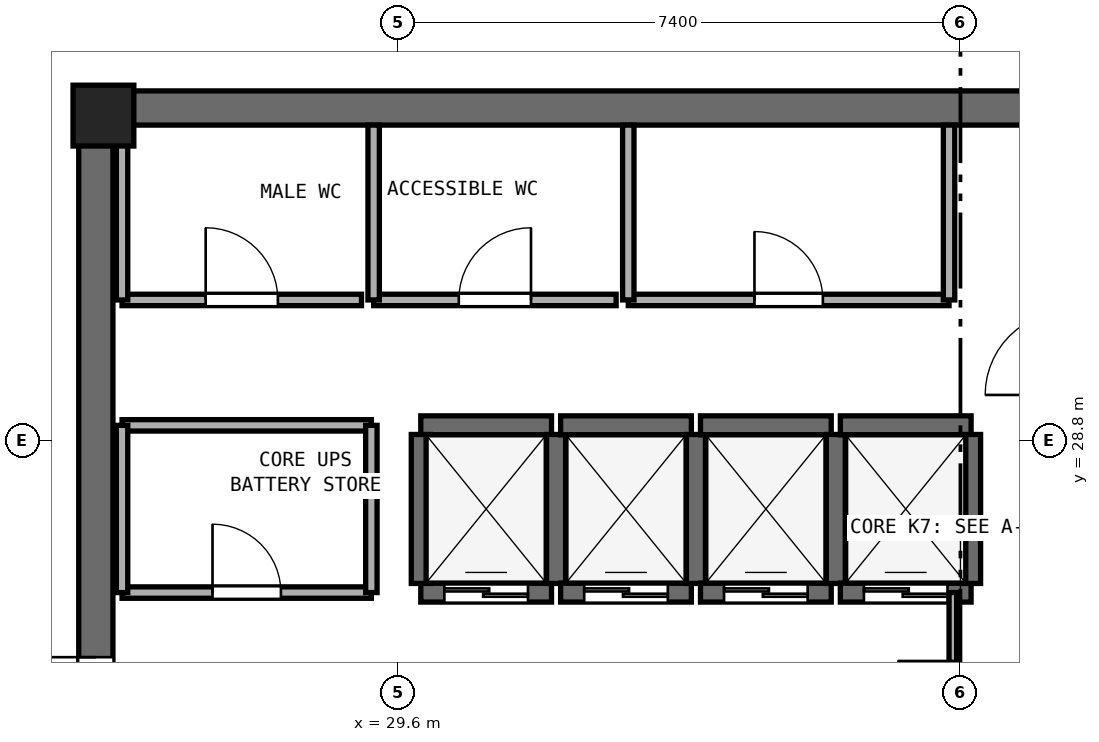
"""IFC4 building model, lengths in metres.
Left out: names, types, materials, properties, quantities, classifications, styles, units other than length and angle.
Written with IfcOpenShell. Run it as: python <this file> out.ifc"""

import sys

from ifc_helpers import new_model, si_unit, direction, frame, frame_2d, origin, origin_2d, place, context, subcontext, project, spatial, rectangle, extrude, element, fill, save


model = new_model("IFC4")
c1 = context("Model", 3, precision=1e-05, world=origin(), true_north=direction((0.0, 1.0)))
c2 = subcontext(c1, "Body", "Model", "MODEL_VIEW")
j1 = project(units=[si_unit("LENGTHUNIT", "METRE"), si_unit("PLANEANGLEUNIT", "RADIAN")], contexts=[c1])
p1 = place(None, origin())
s1 = spatial("IfcSite", under=j1, at=p1, CompositionType="ELEMENT")
p2 = place(p1, origin())
s2 = spatial("IfcBuilding", under=s1, at=p2, CompositionType="ELEMENT")
p3 = place(p2, frame((0.0, 0.0, 240.2)))
s3 = spatial("IfcBuildingStorey", under=s2, at=p3, CompositionType="ELEMENT", Elevation=240.2)
p4 = place(p3, frame((25.4, 33.175, 0.0), z_axis=(0.0, 0.0, 1.0), x_axis=(1.0, 0.0, 0.0)))
e1 = element("IfcWall", 1, at=p4, inside=s3, PredefinedType="SHEAR", context=c2, shape_type="SweptSolid", body=[
    extrude(rectangle(XDim=23.2, YDim=0.45, at=frame_2d((11.6, 0.0))), origin(), (0.0, 0.0, 1.0), 3.51),
])
p5 = place(p3, frame((25.625, 17.45, 0.0), z_axis=(0.0, 0.0, 1.0), x_axis=(0.0, 1.0, 0.0)))
e2 = element("IfcWall", 2, at=p5, inside=s3, PredefinedType="SHEAR", context=c2, shape_type="SweptSolid", body=[
    extrude(rectangle(XDim=15.5, YDim=0.45, at=frame_2d((7.75, 0.0))), origin(), (0.0, 0.0, 1.0), 3.51),
])
p6 = place(p5, frame((7.0, 0.0, 0.0)))
e3 = element("IfcOpeningElement", 3, at=p6, cuts=e2, PredefinedType="OPENING", context=c2, shape_type="SweptSolid", body=[
    extrude(rectangle(XDim=1.5, YDim=2.15, at=frame_2d((0.75, 1.075))), frame((0.0, 0.235, 0.0), z_axis=(0.0, -1.0, 0.0), x_axis=(1.0, 0.0, 0.0)), (0.0, 0.0, 1.0), 0.47),
])
p7 = place(p3, frame((25.725, 33.075, 0.0), z_axis=(0.0, 0.0, 1.0), x_axis=(1.0, 0.0, 0.0)))
e4 = element("IfcColumn", 4, at=p7, inside=s3, PredefinedType="PILASTER", context=c2, shape_type="SweptSolid", body=[
    extrude(rectangle(XDim=0.8, YDim=0.8, at=origin_2d()), origin(), (0.0, 0.0, 1.0), 3.8),
])
p8 = place(p3, frame((29.9, 26.8, 0.0), z_axis=(0.0, 0.0, 1.0), x_axis=(1.0, 0.0, 0.0)))
e5 = element("IfcWall", 5, at=p8, inside=s3, PredefinedType="SHEAR", context=c2, shape_type="SweptSolid", body=[
    extrude(rectangle(XDim=1.72, YDim=0.25, at=frame_2d((0.86, 0.0))), origin(), (0.0, 0.0, 1.0), 3.51),
])
p9 = place(p8, frame((0.31, 0.0, 0.0)))
e6 = element("IfcOpeningElement", 6, at=p9, cuts=e5, PredefinedType="OPENING", context=c2, shape_type="SweptSolid", body=[
    extrude(rectangle(XDim=1.1, YDim=2.15, at=frame_2d((0.55, 1.075))), frame((0.0, 0.135, 0.0), z_axis=(0.0, -1.0, 0.0), x_axis=(1.0, 0.0, 0.0)), (0.0, 0.0, 1.0), 0.27),
])
p10 = place(p3, frame((29.9, 29.0, 0.0), z_axis=(0.0, 0.0, 1.0), x_axis=(1.0, 0.0, 0.0)))
e7 = element("IfcWall", 7, at=p10, inside=s3, PredefinedType="SHEAR", context=c2, shape_type="SweptSolid", body=[
    extrude(rectangle(XDim=1.72, YDim=0.25, at=frame_2d((0.86, 0.0))), origin(), (0.0, 0.0, 1.0), 3.51),
])
for number, where, z_axis, x_axis in (
    (8, (29.9, 26.92, 0.0), (0.0, 0.0, 1.0), (0.0, 1.0, 0.0)),
    (9, (31.68, 26.92, 0.0), (0.0, 0.0, 1.0), (0.0, 1.0, 0.0)),
):
    element("IfcWall", number, at=place(p3, frame(where, z_axis=z_axis, x_axis=x_axis)), inside=s3, PredefinedType="SHEAR", context=c2, shape_type="SweptSolid", body=[
        extrude(rectangle(XDim=1.96, YDim=0.25, at=frame_2d((0.98, 0.0))), origin(), (0.0, 0.0, 1.0), 3.51),
    ])
p11 = place(p3, frame((31.74, 26.8, 0.0), z_axis=(0.0, 0.0, 1.0), x_axis=(1.0, 0.0, 0.0)))
e10 = element("IfcWall", 10, at=p11, inside=s3, PredefinedType="SHEAR", context=c2, shape_type="SweptSolid", body=[
    extrude(rectangle(XDim=1.72, YDim=0.25, at=frame_2d((0.86, 0.0))), origin(), (0.0, 0.0, 1.0), 3.51),
])
p12 = place(p11, frame((0.31, 0.0, 0.0)))
e11 = element("IfcOpeningElement", 11, at=p12, cuts=e10, PredefinedType="OPENING", context=c2, shape_type="SweptSolid", body=[
    extrude(rectangle(XDim=1.1, YDim=2.15, at=frame_2d((0.55, 1.075))), frame((0.0, 0.135, 0.0), z_axis=(0.0, -1.0, 0.0), x_axis=(1.0, 0.0, 0.0)), (0.0, 0.0, 1.0), 0.27),
])
p13 = place(p3, frame((31.74, 29.0, 0.0), z_axis=(0.0, 0.0, 1.0), x_axis=(1.0, 0.0, 0.0)))
e12 = element("IfcWall", 12, at=p13, inside=s3, PredefinedType="SHEAR", context=c2, shape_type="SweptSolid", body=[
    extrude(rectangle(XDim=1.72, YDim=0.25, at=frame_2d((0.86, 0.0))), origin(), (0.0, 0.0, 1.0), 3.51),
])
p14 = place(p3, frame((33.52, 26.92, 0.0), z_axis=(0.0, 0.0, 1.0), x_axis=(0.0, 1.0, 0.0)))
e13 = element("IfcWall", 13, at=p14, inside=s3, PredefinedType="SHEAR", context=c2, shape_type="SweptSolid", body=[
    extrude(rectangle(XDim=1.96, YDim=0.25, at=frame_2d((0.98, 0.0))), origin(), (0.0, 0.0, 1.0), 3.51),
])
p15 = place(p3, frame((33.58, 26.8, 0.0), z_axis=(0.0, 0.0, 1.0), x_axis=(1.0, 0.0, 0.0)))
e14 = element("IfcWall", 14, at=p15, inside=s3, PredefinedType="SHEAR", context=c2, shape_type="SweptSolid", body=[
    extrude(rectangle(XDim=1.72, YDim=0.25, at=frame_2d((0.86, 0.0))), origin(), (0.0, 0.0, 1.0), 3.51),
])
p16 = place(p15, frame((0.31, 0.0, 0.0)))
e15 = element("IfcOpeningElement", 15, at=p16, cuts=e14, PredefinedType="OPENING", context=c2, shape_type="SweptSolid", body=[
    extrude(rectangle(XDim=1.1, YDim=2.15, at=frame_2d((0.55, 1.075))), frame((0.0, 0.135, 0.0), z_axis=(0.0, -1.0, 0.0), x_axis=(1.0, 0.0, 0.0)), (0.0, 0.0, 1.0), 0.27),
])
p17 = place(p3, frame((33.58, 29.0, 0.0), z_axis=(0.0, 0.0, 1.0), x_axis=(1.0, 0.0, 0.0)))
e16 = element("IfcWall", 16, at=p17, inside=s3, PredefinedType="SHEAR", context=c2, shape_type="SweptSolid", body=[
    extrude(rectangle(XDim=1.72, YDim=0.25, at=frame_2d((0.86, 0.0))), origin(), (0.0, 0.0, 1.0), 3.51),
])
p18 = place(p3, frame((35.36, 26.92, 0.0), z_axis=(0.0, 0.0, 1.0), x_axis=(0.0, 1.0, 0.0)))
e17 = element("IfcWall", 17, at=p18, inside=s3, PredefinedType="SHEAR", context=c2, shape_type="SweptSolid", body=[
    extrude(rectangle(XDim=1.96, YDim=0.25, at=frame_2d((0.98, 0.0))), origin(), (0.0, 0.0, 1.0), 3.51),
])
p19 = place(p3, frame((35.42, 26.8, 0.0), z_axis=(0.0, 0.0, 1.0), x_axis=(1.0, 0.0, 0.0)))
e18 = element("IfcWall", 18, at=p19, inside=s3, PredefinedType="SHEAR", context=c2, shape_type="SweptSolid", body=[
    extrude(rectangle(XDim=1.72, YDim=0.25, at=frame_2d((0.86, 0.0))), origin(), (0.0, 0.0, 1.0), 3.51),
])
p20 = place(p19, frame((0.31, 0.0, 0.0)))
e19 = element("IfcOpeningElement", 19, at=p20, cuts=e18, PredefinedType="OPENING", context=c2, shape_type="SweptSolid", body=[
    extrude(rectangle(XDim=1.1, YDim=2.15, at=frame_2d((0.55, 1.075))), frame((0.0, 0.135, 0.0), z_axis=(0.0, -1.0, 0.0), x_axis=(1.0, 0.0, 0.0)), (0.0, 0.0, 1.0), 0.27),
])
p21 = place(p3, frame((35.42, 29.0, 0.0), z_axis=(0.0, 0.0, 1.0), x_axis=(1.0, 0.0, 0.0)))
e20 = element("IfcWall", 20, at=p21, inside=s3, PredefinedType="SHEAR", context=c2, shape_type="SweptSolid", body=[
    extrude(rectangle(XDim=1.72, YDim=0.25, at=frame_2d((0.86, 0.0))), origin(), (0.0, 0.0, 1.0), 3.51),
])
p22 = place(p3, frame((37.14, 26.92, 0.0), z_axis=(0.0, 0.0, 1.0), x_axis=(0.0, 1.0, 0.0)))
e21 = element("IfcWall", 21, at=p22, inside=s3, PredefinedType="SHEAR", context=c2, shape_type="SweptSolid", body=[
    extrude(rectangle(XDim=1.96, YDim=0.25, at=frame_2d((0.98, 0.0))), origin(), (0.0, 0.0, 1.0), 3.51),
])
p23 = place(p3, frame((25.97, 30.65, 0.0), z_axis=(0.0, 0.0, 1.0), x_axis=(1.0, 0.0, 0.0)))
e22 = element("IfcWall", 22, at=p23, inside=s3, PredefinedType="PARTITIONING", context=c2, shape_type="SweptSolid", body=[
    extrude(rectangle(XDim=3.15, YDim=0.15, at=frame_2d((1.575, 0.0))), origin(), (0.0, 0.0, 1.0), 3.51),
])
p24 = place(p23, frame((1.1, 0.0, 0.0)))
e23 = element("IfcOpeningElement", 23, at=p24, cuts=e22, PredefinedType="OPENING", context=c2, shape_type="SweptSolid", body=[
    extrude(rectangle(XDim=0.95, YDim=2.1, at=frame_2d((0.475, 1.05))), frame((0.0, 0.085, 0.0), z_axis=(0.0, -1.0, 0.0), x_axis=(1.0, 0.0, 0.0)), (0.0, 0.0, 1.0), 0.17),
])
p25 = place(p3, frame((25.97, 30.65, 0.0), z_axis=(0.0, 0.0, 1.0), x_axis=(0.0, 1.0, 0.0)))
e24 = element("IfcWall", 24, at=p25, inside=s3, PredefinedType="PARTITIONING", context=c2, shape_type="SweptSolid", body=[
    extrude(rectangle(XDim=2.3, YDim=0.15, at=frame_2d((1.15, 0.0))), origin(), (0.0, 0.0, 1.0), 2.61),
])
p26 = place(p3, frame((29.28, 30.65, 0.0), z_axis=(0.0, 0.0, 1.0), x_axis=(1.0, 0.0, 0.0)))
e25 = element("IfcWall", 25, at=p26, inside=s3, PredefinedType="PARTITIONING", context=c2, shape_type="SweptSolid", body=[
    extrude(rectangle(XDim=3.19, YDim=0.15, at=frame_2d((1.595, 0.0))), origin(), (0.0, 0.0, 1.0), 3.51),
])
p27 = place(p26, frame((1.12, 0.0, 0.0)))
e26 = element("IfcOpeningElement", 26, at=p27, cuts=e25, PredefinedType="OPENING", context=c2, shape_type="SweptSolid", body=[
    extrude(rectangle(XDim=0.95, YDim=2.1, at=frame_2d((0.475, 1.05))), frame((0.0, 0.085, 0.0), z_axis=(0.0, -1.0, 0.0), x_axis=(1.0, 0.0, 0.0)), (0.0, 0.0, 1.0), 0.17),
])
p28 = place(p3, frame((29.28, 30.65, 0.0), z_axis=(0.0, 0.0, 1.0), x_axis=(0.0, 1.0, 0.0)))
e27 = element("IfcWall", 27, at=p28, inside=s3, PredefinedType="PARTITIONING", context=c2, shape_type="SweptSolid", body=[
    extrude(rectangle(XDim=2.3, YDim=0.15, at=frame_2d((1.15, 0.0))), origin(), (0.0, 0.0, 1.0), 3.51),
])
p29 = place(p3, frame((32.63, 30.65, 0.0), z_axis=(0.0, 0.0, 1.0), x_axis=(1.0, 0.0, 0.0)))
e28 = element("IfcWall", 28, at=p29, inside=s3, PredefinedType="PARTITIONING", context=c2, shape_type="SweptSolid", body=[
    extrude(rectangle(XDim=4.22, YDim=0.15, at=frame_2d((2.11, 0.0))), origin(), (0.0, 0.0, 1.0), 3.51),
])
p30 = place(p29, frame((1.66, 0.0, 0.0)))
e29 = element("IfcOpeningElement", 29, at=p30, cuts=e28, PredefinedType="OPENING", context=c2, shape_type="SweptSolid", body=[
    extrude(rectangle(XDim=0.9, YDim=2.1, at=frame_2d((0.45, 1.05))), frame((0.0, 0.085, 0.0), z_axis=(0.0, -1.0, 0.0), x_axis=(1.0, 0.0, 0.0)), (0.0, 0.0, 1.0), 0.17),
])
for number, where, z_axis, x_axis in (
    (30, (32.63, 30.65, 0.0), (0.0, 0.0, 1.0), (0.0, 1.0, 0.0)),
    (31, (36.85, 30.65, 0.0), (0.0, 0.0, 1.0), (0.0, 1.0, 0.0)),
):
    element("IfcWall", number, at=place(p3, frame(where, z_axis=z_axis, x_axis=x_axis)), inside=s3, PredefinedType="PARTITIONING", context=c2, shape_type="SweptSolid", body=[
        extrude(rectangle(XDim=2.3, YDim=0.15, at=frame_2d((1.15, 0.0))), origin(), (0.0, 0.0, 1.0), 3.51),
    ])
p31 = place(p3, frame((25.97, 26.8, 0.0), z_axis=(0.0, 0.0, 1.0), x_axis=(1.0, 0.0, 0.0)))
e32 = element("IfcWall", 32, at=p31, inside=s3, PredefinedType="PARTITIONING", context=c2, shape_type="SweptSolid", body=[
    extrude(rectangle(XDim=3.28, YDim=0.15, at=frame_2d((1.64, 0.0))), origin(), (0.0, 0.0, 1.0), 3.51),
])
p32 = place(p31, frame((1.19, 0.0, 0.0)))
e33 = element("IfcOpeningElement", 33, at=p32, cuts=e32, PredefinedType="OPENING", context=c2, shape_type="SweptSolid", body=[
    extrude(rectangle(XDim=0.9, YDim=2.1, at=frame_2d((0.45, 1.05))), frame((0.0, 0.085, 0.0), z_axis=(0.0, -1.0, 0.0), x_axis=(1.0, 0.0, 0.0)), (0.0, 0.0, 1.0), 0.17),
])
p33 = place(p3, frame((25.97, 29.0, 0.0), z_axis=(0.0, 0.0, 1.0), x_axis=(1.0, 0.0, 0.0)))
e34 = element("IfcWall", 34, at=p33, inside=s3, PredefinedType="PARTITIONING", context=c2, shape_type="SweptSolid", body=[
    extrude(rectangle(XDim=3.28, YDim=0.15, at=frame_2d((1.64, 0.0))), origin(), (0.0, 0.0, 1.0), 3.51),
])
p34 = place(p3, frame((25.97, 26.8, 0.0), z_axis=(0.0, 0.0, 1.0), x_axis=(0.0, 1.0, 0.0)))
e35 = element("IfcWall", 35, at=p34, inside=s3, PredefinedType="PARTITIONING", context=c2, shape_type="SweptSolid", body=[
    extrude(rectangle(XDim=2.2, YDim=0.15, at=frame_2d((1.1, 0.0))), origin(), (0.0, 0.0, 1.0), 2.61),
])
p35 = place(p3, frame((29.25, 26.8, 0.0), z_axis=(0.0, 0.0, 1.0), x_axis=(0.0, 1.0, 0.0)))
e36 = element("IfcWall", 36, at=p35, inside=s3, PredefinedType="PARTITIONING", context=c2, shape_type="SweptSolid", body=[
    extrude(rectangle(XDim=2.2, YDim=0.15, at=frame_2d((1.1, 0.0))), origin(), (0.0, 0.0, 1.0), 3.51),
])
p36 = place(p3, frame((36.9, 23.6, 0.0), z_axis=(0.0, 0.0, 1.0), x_axis=(0.0, 1.0, 0.0)))
e37 = element("IfcWall", 37, at=p36, inside=s3, PredefinedType="PARTITIONING", context=c2, shape_type="SweptSolid", body=[
    extrude(rectangle(XDim=3.2, YDim=0.1, at=frame_2d((1.6, 0.0))), origin(), (0.0, 0.0, 1.0), 3.51),
])
p37 = place(p36, frame((0.85, 0.0, 0.0)))
e38 = element("IfcOpeningElement", 38, at=p37, cuts=e37, PredefinedType="OPENING", context=c2, shape_type="SweptSolid", body=[
    extrude(rectangle(XDim=1.45, YDim=2.12, at=frame_2d((0.725, 1.06))), frame((0.0, 0.06, 0.0), z_axis=(0.0, -1.0, 0.0), x_axis=(1.0, 0.0, 0.0)), (0.0, 0.0, 1.0), 0.12),
])
p38 = place(p9, origin())
e39 = element("IfcDoor", 39, at=p38, inside=s3, OperationType="DOUBLE_DOOR_SLIDING", PredefinedType="DOOR", context=c2, shape_type="SweptSolid", body=[
    extrude(rectangle(XDim=1.1, YDim=2.15, at=frame_2d((0.55, 1.075))), frame((0.0, 0.025, 0.0), z_axis=(0.0, -1.0, 0.0), x_axis=(1.0, 0.0, 0.0)), (0.0, 0.0, 1.0), 0.05),
])
fill(e6, e39)
p39 = place(p12, origin())
e40 = element("IfcDoor", 40, at=p39, inside=s3, OperationType="DOUBLE_DOOR_SLIDING", PredefinedType="DOOR", context=c2, shape_type="SweptSolid", body=[
    extrude(rectangle(XDim=1.1, YDim=2.15, at=frame_2d((0.55, 1.075))), frame((0.0, 0.025, 0.0), z_axis=(0.0, -1.0, 0.0), x_axis=(1.0, 0.0, 0.0)), (0.0, 0.0, 1.0), 0.05),
])
fill(e11, e40)
p40 = place(p16, origin())
e41 = element("IfcDoor", 41, at=p40, inside=s3, OperationType="DOUBLE_DOOR_SLIDING", PredefinedType="DOOR", context=c2, shape_type="SweptSolid", body=[
    extrude(rectangle(XDim=1.1, YDim=2.15, at=frame_2d((0.55, 1.075))), frame((0.0, 0.025, 0.0), z_axis=(0.0, -1.0, 0.0), x_axis=(1.0, 0.0, 0.0)), (0.0, 0.0, 1.0), 0.05),
])
fill(e15, e41)
p41 = place(p20, origin())
e42 = element("IfcDoor", 42, at=p41, inside=s3, OperationType="DOUBLE_DOOR_SLIDING", PredefinedType="DOOR", context=c2, shape_type="SweptSolid", body=[
    extrude(rectangle(XDim=1.1, YDim=2.15, at=frame_2d((0.55, 1.075))), frame((0.0, 0.025, 0.0), z_axis=(0.0, -1.0, 0.0), x_axis=(1.0, 0.0, 0.0)), (0.0, 0.0, 1.0), 0.05),
])
fill(e19, e42)
p42 = place(p6, origin())
e43 = element("IfcDoor", 43, at=p42, inside=s3, OperationType="DOUBLE_DOOR_SINGLE_SWING", PredefinedType="DOOR", context=c2, shape_type="SweptSolid", body=[
    extrude(rectangle(XDim=1.5, YDim=2.15, at=frame_2d((0.75, 1.075))), frame((0.0, 0.025, 0.0), z_axis=(0.0, -1.0, 0.0), x_axis=(1.0, 0.0, 0.0)), (0.0, 0.0, 1.0), 0.05),
])
fill(e3, e43)
p43 = place(p24, origin())
e44 = element("IfcDoor", 44, at=p43, inside=s3, OperationType="SINGLE_SWING_LEFT", PredefinedType="DOOR", context=c2, shape_type="SweptSolid", body=[
    extrude(rectangle(XDim=0.95, YDim=2.1, at=frame_2d((0.475, 1.05))), frame((0.0, 0.025, 0.0), z_axis=(0.0, -1.0, 0.0), x_axis=(1.0, 0.0, 0.0)), (0.0, 0.0, 1.0), 0.05),
])
fill(e23, e44)
p44 = place(p27, origin())
e45 = element("IfcDoor", 45, at=p44, inside=s3, OperationType="SINGLE_SWING_RIGHT", PredefinedType="DOOR", context=c2, shape_type="SweptSolid", body=[
    extrude(rectangle(XDim=0.95, YDim=2.1, at=frame_2d((0.475, 1.05))), frame((0.0, 0.025, 0.0), z_axis=(0.0, -1.0, 0.0), x_axis=(1.0, 0.0, 0.0)), (0.0, 0.0, 1.0), 0.05),
])
fill(e26, e45)
p45 = place(p30, origin())
e46 = element("IfcDoor", 46, at=p45, inside=s3, OperationType="SINGLE_SWING_LEFT", PredefinedType="DOOR", context=c2, shape_type="SweptSolid", body=[
    extrude(rectangle(XDim=0.9, YDim=2.1, at=frame_2d((0.45, 1.05))), frame((0.0, 0.025, 0.0), z_axis=(0.0, -1.0, 0.0), x_axis=(1.0, 0.0, 0.0)), (0.0, 0.0, 1.0), 0.05),
])
fill(e29, e46)
p46 = place(p32, origin())
e47 = element("IfcDoor", 47, at=p46, inside=s3, OperationType="SINGLE_SWING_LEFT", PredefinedType="DOOR", context=c2, shape_type="SweptSolid", body=[
    extrude(rectangle(XDim=0.9, YDim=2.1, at=frame_2d((0.45, 1.05))), frame((0.0, 0.025, 0.0), z_axis=(0.0, -1.0, 0.0), x_axis=(1.0, 0.0, 0.0)), (0.0, 0.0, 1.0), 0.05),
])
fill(e33, e47)
p47 = place(p37, origin())
e48 = element("IfcDoor", 48, at=p47, inside=s3, OperationType="DOUBLE_DOOR_SINGLE_SWING", PredefinedType="DOOR", context=c2, shape_type="SweptSolid", body=[
    extrude(rectangle(XDim=1.45, YDim=2.12, at=frame_2d((0.725, 1.06))), frame((0.0, 0.025, 0.0), z_axis=(0.0, -1.0, 0.0), x_axis=(1.0, 0.0, 0.0)), (0.0, 0.0, 1.0), 0.05),
])
fill(e38, e48)
save(model, sys.argv[1])
